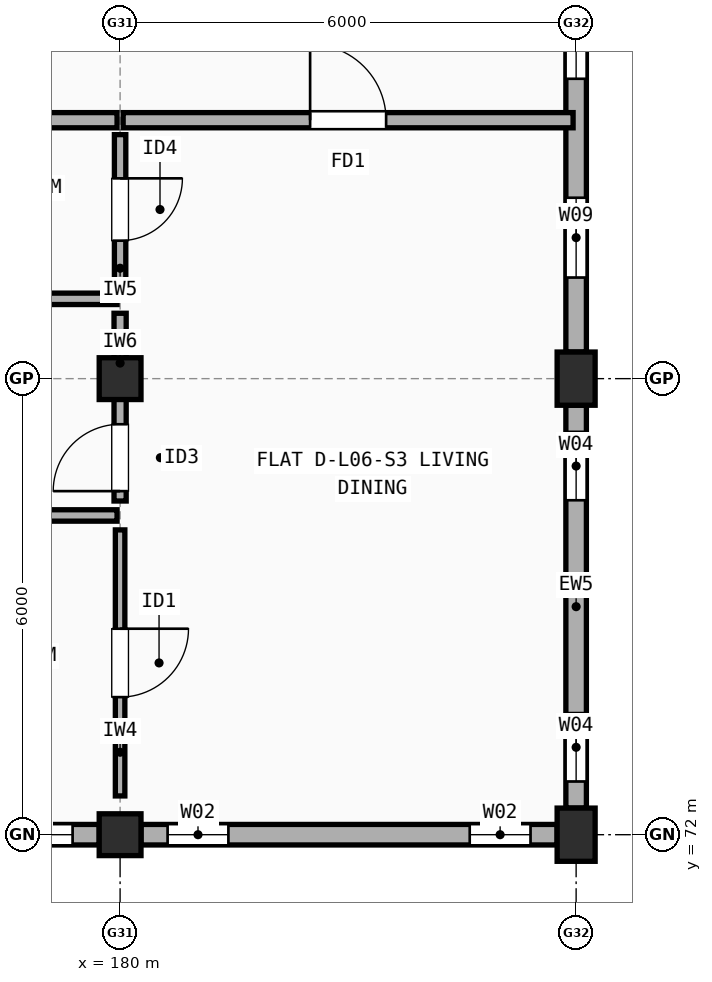
"""IFC4 building model, lengths in metres.
Left out: names, types, materials, properties, quantities, classifications, styles, units other than length and angle.
Written with IfcOpenShell. Run it as: python <this file> out.ifc"""

import sys

from ifc_helpers import new_model, si_unit, direction, frame, frame_2d, origin, origin_2d, place, context, subcontext, project, spatial, rectangle, extrude, element, fill, save


model = new_model("IFC4")
c1 = context("Model", 3, precision=1e-05, world=origin(), true_north=direction((0.0, 1.0)))
c2 = subcontext(c1, "Body", "Model", "MODEL_VIEW")
j1 = project(units=[si_unit("LENGTHUNIT", "METRE"), si_unit("PLANEANGLEUNIT", "RADIAN")], contexts=[c1])
p1 = place(None, origin())
s1 = spatial("IfcSite", under=j1, at=p1, CompositionType="ELEMENT")
p2 = place(p1, origin())
s2 = spatial("IfcBuilding", under=s1, at=p2, CompositionType="ELEMENT")
p3 = place(p2, frame((0.0, 0.0, 20.5)))
s3 = spatial("IfcBuildingStorey", under=s2, at=p3, CompositionType="ELEMENT", Elevation=20.5)
for number, where, z_axis, x_axis in (
    (1, (180.0, 72.0, 0.0), (0.0, 0.0, 1.0), (1.0, 0.0, 0.0)),
    (2, (180.0, 78.0, 0.0), (0.0, 0.0, 1.0), (1.0, 0.0, 0.0)),
):
    element("IfcColumn", number, at=place(p3, frame(where, z_axis=z_axis, x_axis=x_axis)), inside=s3, PredefinedType="COLUMN", context=c2, shape_type="SweptSolid", body=[
        extrude(rectangle(XDim=0.55, YDim=0.55, at=origin_2d()), origin(), (0.0, 0.0, 1.0), 2.97),
    ])
for number, where, z_axis, x_axis in (
    (3, (186.0, 72.0, 0.0), (0.0, 0.0, 1.0), (1.0, 0.0, 0.0)),
    (4, (186.0, 78.0, 0.0), (0.0, 0.0, 1.0), (1.0, 0.0, 0.0)),
):
    element("IfcColumn", number, at=place(p3, frame(where, z_axis=z_axis, x_axis=x_axis)), inside=s3, PredefinedType="COLUMN", context=c2, shape_type="SweptSolid", body=[
        extrude(rectangle(XDim=0.5, YDim=0.7, at=origin_2d()), origin(), (0.0, 0.0, 1.0), 2.97),
    ])
p4 = place(p3, frame((174.275, 72.0, 0.0), z_axis=(0.0, 0.0, 1.0), x_axis=(1.0, 0.0, 0.0)))
e5 = element("IfcWall", 5, at=p4, inside=s3, PredefinedType="STANDARD", context=c2, shape_type="SweptSolid", body=[
    extrude(rectangle(XDim=5.45, YDim=0.27, at=frame_2d((2.725, 0.0))), origin(), (0.0, 0.0, 1.0), 2.452),
])
p5 = place(p4, frame((1.615, 0.0, 0.9)))
e6 = element("IfcOpeningElement", 6, at=p5, cuts=e5, PredefinedType="OPENING", context=c2, shape_type="SweptSolid", body=[
    extrude(rectangle(XDim=1.05, YDim=1.35, at=frame_2d((0.525, 0.675))), frame((0.0, 0.145, 0.0), z_axis=(0.0, -1.0, 0.0), x_axis=(1.0, 0.0, 0.0)), (0.0, 0.0, 1.0), 0.29),
])
p6 = place(p4, frame((4.05, 0.0, 0.9)))
e7 = element("IfcOpeningElement", 7, at=p6, cuts=e5, PredefinedType="OPENING", context=c2, shape_type="SweptSolid", body=[
    extrude(rectangle(XDim=1.05, YDim=1.35, at=frame_2d((0.525, 0.675))), frame((0.0, 0.145, 0.0), z_axis=(0.0, -1.0, 0.0), x_axis=(1.0, 0.0, 0.0)), (0.0, 0.0, 1.0), 0.29),
])
p7 = place(p3, frame((180.275, 72.0, 0.0), z_axis=(0.0, 0.0, 1.0), x_axis=(1.0, 0.0, 0.0)))
e8 = element("IfcWall", 8, at=p7, inside=s3, PredefinedType="STANDARD", context=c2, shape_type="SweptSolid", body=[
    extrude(rectangle(XDim=5.475, YDim=0.27, at=frame_2d((2.738, 0.0))), origin(), (0.0, 0.0, 1.0), 2.452),
])
p8 = place(p7, frame((0.35, 0.0, 0.9)))
e9 = element("IfcOpeningElement", 9, at=p8, cuts=e8, PredefinedType="OPENING", context=c2, shape_type="SweptSolid", body=[
    extrude(rectangle(XDim=0.8, YDim=1.2, at=frame_2d((0.4, 0.6))), frame((0.0, 0.145, 0.0), z_axis=(0.0, -1.0, 0.0), x_axis=(1.0, 0.0, 0.0)), (0.0, 0.0, 1.0), 0.29),
])
p9 = place(p7, frame((4.325, 0.0, 0.9)))
e10 = element("IfcOpeningElement", 10, at=p9, cuts=e8, PredefinedType="OPENING", context=c2, shape_type="SweptSolid", body=[
    extrude(rectangle(XDim=0.8, YDim=1.2, at=frame_2d((0.4, 0.6))), frame((0.0, 0.145, 0.0), z_axis=(0.0, -1.0, 0.0), x_axis=(1.0, 0.0, 0.0)), (0.0, 0.0, 1.0), 0.29),
])
p10 = place(p3, frame((186.0, 72.35, 0.0), z_axis=(0.0, 0.0, 1.0), x_axis=(0.0, 1.0, 0.0)))
e11 = element("IfcWall", 11, at=p10, inside=s3, PredefinedType="STANDARD", context=c2, shape_type="SweptSolid", body=[
    extrude(rectangle(XDim=5.3, YDim=0.27, at=frame_2d((2.65, 0.0))), origin(), (0.0, 0.0, 1.0), 2.452),
])
p11 = place(p10, frame((0.35, 0.0, 0.9)))
e12 = element("IfcOpeningElement", 12, at=p11, cuts=e11, PredefinedType="OPENING", context=c2, shape_type="SweptSolid", body=[
    extrude(rectangle(XDim=0.9, YDim=1.3, at=frame_2d((0.45, 0.65))), frame((0.0, 0.145, 0.0), z_axis=(0.0, -1.0, 0.0), x_axis=(1.0, 0.0, 0.0)), (0.0, 0.0, 1.0), 0.29),
])
p12 = place(p10, frame((4.05, 0.0, 0.9)))
e13 = element("IfcOpeningElement", 13, at=p12, cuts=e11, PredefinedType="OPENING", context=c2, shape_type="SweptSolid", body=[
    extrude(rectangle(XDim=0.9, YDim=1.3, at=frame_2d((0.45, 0.65))), frame((0.0, 0.145, 0.0), z_axis=(0.0, -1.0, 0.0), x_axis=(1.0, 0.0, 0.0)), (0.0, 0.0, 1.0), 0.29),
])
p13 = place(p3, frame((186.0, 78.35, 0.0), z_axis=(0.0, 0.0, 1.0), x_axis=(0.0, 1.0, 0.0)))
e14 = element("IfcWall", 14, at=p13, inside=s3, PredefinedType="STANDARD", context=c2, shape_type="SweptSolid", body=[
    extrude(rectangle(XDim=5.3, YDim=0.27, at=frame_2d((2.65, 0.0))), origin(), (0.0, 0.0, 1.0), 2.452),
])
p14 = place(p13, frame((0.98, 0.0, 0.9)))
e15 = element("IfcOpeningElement", 15, at=p14, cuts=e14, PredefinedType="OPENING", context=c2, shape_type="SweptSolid", body=[
    extrude(rectangle(XDim=1.05, YDim=1.35, at=frame_2d((0.525, 0.675))), frame((0.0, 0.145, 0.0), z_axis=(0.0, -1.0, 0.0), x_axis=(1.0, 0.0, 0.0)), (0.0, 0.0, 1.0), 0.29),
])
p15 = place(p13, frame((3.595, 0.0, 0.9)))
e16 = element("IfcOpeningElement", 16, at=p15, cuts=e14, PredefinedType="OPENING", context=c2, shape_type="SweptSolid", body=[
    extrude(rectangle(XDim=1.2, YDim=1.35, at=frame_2d((0.6, 0.675))), frame((0.0, 0.145, 0.0), z_axis=(0.0, -1.0, 0.0), x_axis=(1.0, 0.0, 0.0)), (0.0, 0.0, 1.0), 0.29),
])
p16 = place(p3, frame((175.54, 81.4, 0.0), z_axis=(0.0, 0.0, 1.0), x_axis=(1.0, 0.0, 0.0)))
e17 = element("IfcWall", 17, at=p16, inside=s3, PredefinedType="SOLIDWALL", context=c2, shape_type="SweptSolid", body=[
    extrude(rectangle(XDim=4.42, YDim=0.2, at=frame_2d((2.21, 0.0))), origin(), (0.0, 0.0, 1.0), 2.548),
])
p17 = place(p3, frame((180.04, 81.4, 0.0), z_axis=(0.0, 0.0, 1.0), x_axis=(1.0, 0.0, 0.0)))
e18 = element("IfcWall", 18, at=p17, inside=s3, PredefinedType="SOLIDWALL", context=c2, shape_type="SweptSolid", body=[
    extrude(rectangle(XDim=5.92, YDim=0.2, at=frame_2d((2.96, 0.0))), origin(), (0.0, 0.0, 1.0), 2.452),
])
p18 = place(p17, frame((2.46, 0.0, 0.0)))
e19 = element("IfcOpeningElement", 19, at=p18, cuts=e18, PredefinedType="OPENING", context=c2, shape_type="SweptSolid", body=[
    extrude(rectangle(XDim=1.0, YDim=2.15, at=frame_2d((0.5, 1.075))), frame((0.0, 0.11, 0.0), z_axis=(0.0, -1.0, 0.0), x_axis=(1.0, 0.0, 0.0)), (0.0, 0.0, 1.0), 0.22),
])
p19 = place(p3, frame((180.0, 72.51, 0.0), z_axis=(0.0, 0.0, 1.0), x_axis=(0.0, 1.0, 0.0)))
e20 = element("IfcWall", 20, at=p19, inside=s3, PredefinedType="PARTITIONING", context=c2, shape_type="SweptSolid", body=[
    extrude(rectangle(XDim=3.5, YDim=0.125, at=frame_2d((1.75, 0.0))), origin(), (0.0, 0.0, 1.0), 2.458),
])
p20 = place(p19, frame((1.3, 0.0, 0.0)))
e21 = element("IfcOpeningElement", 21, at=p20, cuts=e20, PredefinedType="OPENING", context=c2, shape_type="SweptSolid", body=[
    extrude(rectangle(XDim=0.9, YDim=2.1, at=frame_2d((0.45, 1.05))), frame((0.0, 0.073, 0.0), z_axis=(0.0, -1.0, 0.0), x_axis=(1.0, 0.0, 0.0)), (0.0, 0.0, 1.0), 0.145),
])
p21 = place(p3, frame((180.0, 76.39, 0.0), z_axis=(0.0, 0.0, 1.0), x_axis=(0.0, 1.0, 0.0)))
e22 = element("IfcWall", 22, at=p21, inside=s3, PredefinedType="PLUMBINGWALL", context=c2, shape_type="SweptSolid", body=[
    extrude(rectangle(XDim=2.47, YDim=0.16, at=frame_2d((1.235, 0.0))), origin(), (0.0, 0.0, 1.0), 2.458),
])
p22 = place(p21, frame((0.13, 0.0, 0.0)))
e23 = element("IfcOpeningElement", 23, at=p22, cuts=e22, PredefinedType="OPENING", context=c2, shape_type="SweptSolid", body=[
    extrude(rectangle(XDim=0.88, YDim=2.1, at=frame_2d((0.44, 1.05))), frame((0.0, 0.09, 0.0), z_axis=(0.0, -1.0, 0.0), x_axis=(1.0, 0.0, 0.0)), (0.0, 0.0, 1.0), 0.18),
])
p23 = place(p3, frame((180.0, 79.24, 0.0), z_axis=(0.0, 0.0, 1.0), x_axis=(0.0, 1.0, 0.0)))
e24 = element("IfcWall", 24, at=p23, inside=s3, PredefinedType="PARTITIONING", context=c2, shape_type="SweptSolid", body=[
    extrude(rectangle(XDim=1.97, YDim=0.15, at=frame_2d((0.985, 0.0))), origin(), (0.0, 0.0, 1.0), 2.548),
])
p24 = place(p23, frame((0.575, 0.0, 0.0)))
e25 = element("IfcOpeningElement", 25, at=p24, cuts=e24, PredefinedType="OPENING", context=c2, shape_type="SweptSolid", body=[
    extrude(rectangle(XDim=0.82, YDim=2.08, at=frame_2d((0.41, 1.04))), frame((0.0, 0.085, 0.0), z_axis=(0.0, -1.0, 0.0), x_axis=(1.0, 0.0, 0.0)), (0.0, 0.0, 1.0), 0.17),
])
p25 = place(p3, frame((175.54, 76.2, 0.0), z_axis=(0.0, 0.0, 1.0), x_axis=(1.0, 0.0, 0.0)))
e26 = element("IfcWall", 26, at=p25, inside=s3, PredefinedType="PARTITIONING", context=c2, shape_type="SweptSolid", body=[
    extrude(rectangle(XDim=4.42, YDim=0.15, at=frame_2d((2.21, 0.0))), origin(), (0.0, 0.0, 1.0), 2.458),
])
p26 = place(p3, frame((175.54, 79.05, 0.0), z_axis=(0.0, 0.0, 1.0), x_axis=(1.0, 0.0, 0.0)))
e27 = element("IfcWall", 27, at=p26, inside=s3, PredefinedType="PARTITIONING", context=c2, shape_type="SweptSolid", body=[
    extrude(rectangle(XDim=4.42, YDim=0.15, at=frame_2d((2.21, 0.0))), origin(), (0.0, 0.0, 1.0), 2.548),
])
p27 = place(p6, origin())
e28 = element("IfcWindow", 28, at=p27, inside=s3, PartitioningType="SINGLE_PANEL", PredefinedType="WINDOW", context=c2, shape_type="SweptSolid", body=[
    extrude(rectangle(XDim=1.05, YDim=1.35, at=frame_2d((0.525, 0.675))), frame((0.0, 0.03, 0.0), z_axis=(0.0, -1.0, 0.0), x_axis=(1.0, 0.0, 0.0)), (0.0, 0.0, 1.0), 0.06),
])
fill(e7, e28)
p28 = place(p8, origin())
e29 = element("IfcWindow", 29, at=p28, inside=s3, PartitioningType="SINGLE_PANEL", PredefinedType="WINDOW", context=c2, shape_type="SweptSolid", body=[
    extrude(rectangle(XDim=0.8, YDim=1.2, at=frame_2d((0.4, 0.6))), frame((0.0, 0.03, 0.0), z_axis=(0.0, -1.0, 0.0), x_axis=(1.0, 0.0, 0.0)), (0.0, 0.0, 1.0), 0.06),
])
fill(e9, e29)
p29 = place(p9, origin())
e30 = element("IfcWindow", 30, at=p29, inside=s3, PartitioningType="SINGLE_PANEL", PredefinedType="WINDOW", context=c2, shape_type="SweptSolid", body=[
    extrude(rectangle(XDim=0.8, YDim=1.2, at=frame_2d((0.4, 0.6))), frame((0.0, 0.03, 0.0), z_axis=(0.0, -1.0, 0.0), x_axis=(1.0, 0.0, 0.0)), (0.0, 0.0, 1.0), 0.06),
])
fill(e10, e30)
p30 = place(p11, origin())
e31 = element("IfcWindow", 31, at=p30, inside=s3, PartitioningType="SINGLE_PANEL", PredefinedType="WINDOW", context=c2, shape_type="SweptSolid", body=[
    extrude(rectangle(XDim=0.9, YDim=1.3, at=frame_2d((0.45, 0.65))), frame((0.0, 0.03, 0.0), z_axis=(0.0, -1.0, 0.0), x_axis=(1.0, 0.0, 0.0)), (0.0, 0.0, 1.0), 0.06),
])
fill(e12, e31)
p31 = place(p12, origin())
e32 = element("IfcWindow", 32, at=p31, inside=s3, PartitioningType="SINGLE_PANEL", PredefinedType="WINDOW", context=c2, shape_type="SweptSolid", body=[
    extrude(rectangle(XDim=0.9, YDim=1.3, at=frame_2d((0.45, 0.65))), frame((0.0, 0.03, 0.0), z_axis=(0.0, -1.0, 0.0), x_axis=(1.0, 0.0, 0.0)), (0.0, 0.0, 1.0), 0.06),
])
fill(e13, e32)
p32 = place(p14, origin())
e33 = element("IfcWindow", 33, at=p32, inside=s3, PartitioningType="SINGLE_PANEL", PredefinedType="WINDOW", context=c2, shape_type="SweptSolid", body=[
    extrude(rectangle(XDim=1.05, YDim=1.35, at=frame_2d((0.525, 0.675))), frame((0.0, 0.03, 0.0), z_axis=(0.0, -1.0, 0.0), x_axis=(1.0, 0.0, 0.0)), (0.0, 0.0, 1.0), 0.06),
])
fill(e15, e33)
p33 = place(p15, origin())
e34 = element("IfcWindow", 34, at=p33, inside=s3, PartitioningType="SINGLE_PANEL", PredefinedType="WINDOW", context=c2, shape_type="SweptSolid", body=[
    extrude(rectangle(XDim=1.2, YDim=1.35, at=frame_2d((0.6, 0.675))), frame((0.0, 0.03, 0.0), z_axis=(0.0, -1.0, 0.0), x_axis=(1.0, 0.0, 0.0)), (0.0, 0.0, 1.0), 0.06),
])
fill(e16, e34)
p34 = place(p18, origin())
e35 = element("IfcDoor", 35, at=p34, inside=s3, OperationType="SINGLE_SWING_LEFT", PredefinedType="DOOR", context=c2, shape_type="SweptSolid", body=[
    extrude(rectangle(XDim=1.0, YDim=2.15, at=frame_2d((0.5, 1.075))), frame((0.0, 0.025, 0.0), z_axis=(0.0, -1.0, 0.0), x_axis=(1.0, 0.0, 0.0)), (0.0, 0.0, 1.0), 0.05),
])
fill(e19, e35)
p35 = place(p20, origin())
e36 = element("IfcDoor", 36, at=p35, inside=s3, OperationType="SINGLE_SWING_RIGHT", PredefinedType="DOOR", context=c2, shape_type="SweptSolid", body=[
    extrude(rectangle(XDim=0.9, YDim=2.1, at=frame_2d((0.45, 1.05))), frame((0.0, 0.025, 0.0), z_axis=(0.0, -1.0, 0.0), x_axis=(1.0, 0.0, 0.0)), (0.0, 0.0, 1.0), 0.05),
])
fill(e21, e36)
p36 = place(p22, origin())
e37 = element("IfcDoor", 37, at=p36, inside=s3, OperationType="SINGLE_SWING_LEFT", PredefinedType="DOOR", context=c2, shape_type="SweptSolid", body=[
    extrude(rectangle(XDim=0.88, YDim=2.1, at=frame_2d((0.44, 1.05))), frame((0.0, 0.025, 0.0), z_axis=(0.0, -1.0, 0.0), x_axis=(1.0, 0.0, 0.0)), (0.0, 0.0, 1.0), 0.05),
])
fill(e23, e37)
p37 = place(p24, origin())
e38 = element("IfcDoor", 38, at=p37, inside=s3, OperationType="SINGLE_SWING_RIGHT", PredefinedType="DOOR", context=c2, shape_type="SweptSolid", body=[
    extrude(rectangle(XDim=0.82, YDim=2.08, at=frame_2d((0.41, 1.04))), frame((0.0, 0.025, 0.0), z_axis=(0.0, -1.0, 0.0), x_axis=(1.0, 0.0, 0.0)), (0.0, 0.0, 1.0), 0.05),
])
fill(e25, e38)
save(model, sys.argv[1])
